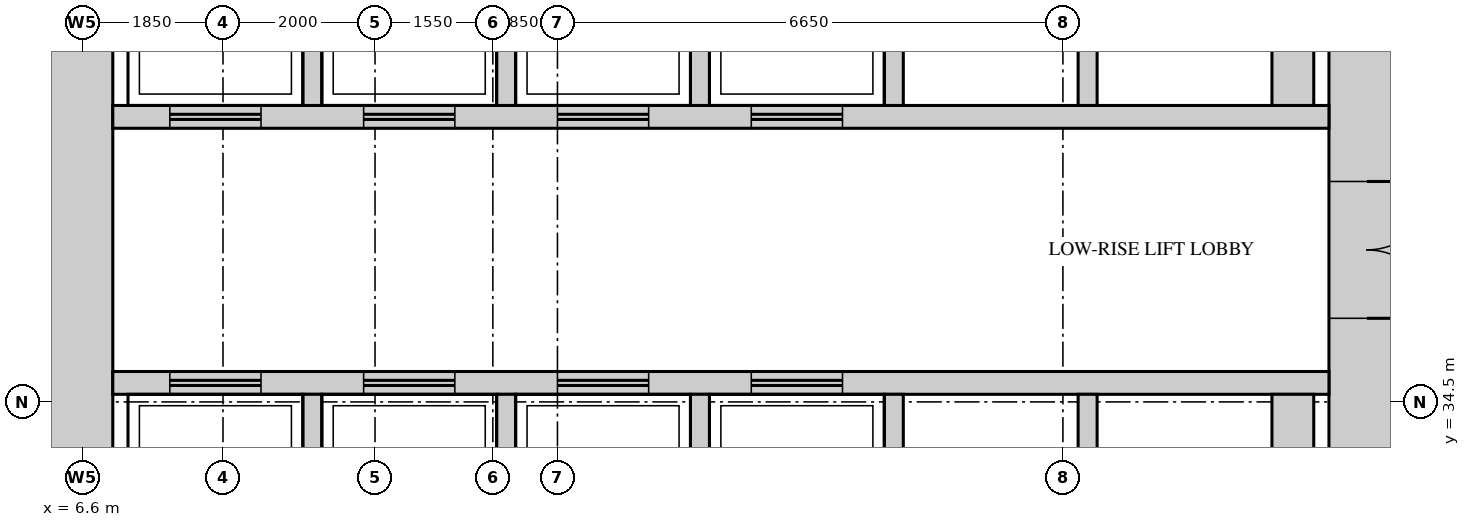
"""IFC4 building model, lengths in metres.
Left out: names, types, materials, properties, quantities, classifications, styles, units other than length and angle.
Written with IfcOpenShell. Run it as: python <this file> out.ifc"""

import sys

from ifc_helpers import new_model, si_unit, direction, frame, frame_2d, origin, place, context, subcontext, project, spatial, rectangle, extrude, source, transform, mapped, element, fill, save


model = new_model("IFC4")
c1 = context("Model", 3, precision=1e-05, world=origin(), true_north=direction((0.0, 1.0)))
c2 = subcontext(c1, "Body", "Model", "MODEL_VIEW")
j1 = project(units=[si_unit("LENGTHUNIT", "METRE"), si_unit("PLANEANGLEUNIT", "RADIAN")], contexts=[c1])
p1 = place(None, origin())
s1 = spatial("IfcSite", under=j1, at=p1, CompositionType="ELEMENT")
p2 = place(p1, origin())
s2 = spatial("IfcBuilding", under=s1, at=p2, CompositionType="ELEMENT")
p3 = place(p2, frame((0.0, 0.0, 110.3)))
s3 = spatial("IfcBuildingStorey", under=s2, at=p3, CompositionType="ELEMENT", Elevation=110.3)
m1 = source(origin(), c2, "Body", "SweptSolid", [
    extrude(rectangle(XDim=28.0, YDim=1.0, at=frame_2d((14.0, 0.0))), origin(), (0.0, 0.0, 1.0), 4.1),
])
p4 = place(p3, frame((23.5, 13.0, 0.0), z_axis=(0.0, 0.0, 1.0), x_axis=(0.0, 1.0, 0.0)))
e1 = element("IfcWall", 1, at=p4, inside=s3, PredefinedType="SHEAR", context=c2, shape_type="MappedRepresentation", body=[
    mapped(m1, transform((0.0, 0.0, 0.0))),
])
m2 = source(origin(), c2, "Body", "SweptSolid", [
    extrude(rectangle(XDim=1.8, YDim=2.1, at=frame_2d((0.9, 1.05))), frame((0.0, 0.51, 0.0), z_axis=(0.0, -1.0, 0.0), x_axis=(1.0, 0.0, 0.0)), (0.0, 0.0, 1.0), 1.02),
])
p5 = place(p4, frame((22.6, 0.0, 0.0)))
e2 = element("IfcOpeningElement", 2, at=p5, cuts=e1, PredefinedType="OPENING", context=c2, shape_type="MappedRepresentation", body=[
    mapped(m2, transform((0.0, 0.0, 0.0))),
])
m3 = source(origin(), c2, "Body", "SweptSolid", [
    extrude(rectangle(XDim=1.2, YDim=2.1, at=frame_2d((0.6, 1.05))), frame((0.0, 0.51, 0.0), z_axis=(0.0, -1.0, 0.0), x_axis=(1.0, 0.0, 0.0)), (0.0, 0.0, 1.0), 1.02),
])
p6 = place(p4, frame((13.85, 0.0, 0.0)))
e3 = element("IfcOpeningElement", 3, at=p6, cuts=e1, PredefinedType="OPENING", context=c2, shape_type="MappedRepresentation", body=[
    mapped(m3, transform((0.0, 0.0, 0.0))),
])
m4 = source(origin(), c2, "Body", "SweptSolid", [
    extrude(rectangle(XDim=0.9, YDim=2.1, at=frame_2d((0.45, 1.05))), frame((0.0, 0.51, 0.0), z_axis=(0.0, -1.0, 0.0), x_axis=(1.0, 0.0, 0.0)), (0.0, 0.0, 1.0), 1.02),
])
p7 = place(p4, frame((1.0, 0.0, 0.0)))
e4 = element("IfcOpeningElement", 4, at=p7, cuts=e1, PredefinedType="OPENING", context=c2, shape_type="MappedRepresentation", body=[
    mapped(m4, transform((0.0, 0.0, 0.0))),
])
p8 = place(p4, frame((4.0, 0.0, 0.0)))
e5 = element("IfcOpeningElement", 5, at=p8, cuts=e1, PredefinedType="OPENING", context=c2, shape_type="MappedRepresentation", body=[
    mapped(m4, transform((0.0, 0.0, 0.0))),
])
p9 = place(p4, frame((7.6, 0.0, 0.0)))
e6 = element("IfcOpeningElement", 6, at=p9, cuts=e1, PredefinedType="OPENING", context=c2, shape_type="MappedRepresentation", body=[
    mapped(m4, transform((0.0, 0.0, 0.0))),
])
p10 = place(p3, frame((6.5, 13.0, 0.0), z_axis=(0.0, 0.0, 1.0), x_axis=(0.0, 1.0, 0.0)))
e7 = element("IfcWall", 7, at=p10, inside=s3, PredefinedType="SHEAR", context=c2, shape_type="MappedRepresentation", body=[
    mapped(m1, transform((0.0, 0.0, 0.0))),
])
m5 = source(origin(), c2, "Body", "SweptSolid", [
    extrude(rectangle(XDim=16.0, YDim=0.3, at=frame_2d((8.0, 0.0))), origin(), (0.0, 0.0, 1.0), 4.1),
])
p11 = place(p3, frame((7.0, 38.25, 0.0), z_axis=(0.0, 0.0, 1.0), x_axis=(1.0, 0.0, 0.0)))
e8 = element("IfcWall", 8, at=p11, inside=s3, PredefinedType="STANDARD", context=c2, shape_type="MappedRepresentation", body=[
    mapped(m5, transform((0.0, 0.0, 0.0))),
])
m6 = source(origin(), c2, "Body", "SweptSolid", [
    extrude(rectangle(XDim=1.2, YDim=2.1, at=frame_2d((0.6, 1.05))), frame((0.0, 0.16, 0.0), z_axis=(0.0, -1.0, 0.0), x_axis=(1.0, 0.0, 0.0)), (0.0, 0.0, 1.0), 0.32),
])
p12 = place(p11, frame((0.75, 0.0, 0.0)))
e9 = element("IfcOpeningElement", 9, at=p12, cuts=e8, PredefinedType="OPENING", context=c2, shape_type="MappedRepresentation", body=[
    mapped(m6, transform((0.0, 0.0, 0.0))),
])
p13 = place(p11, frame((3.3, 0.0, 0.0)))
e10 = element("IfcOpeningElement", 10, at=p13, cuts=e8, PredefinedType="OPENING", context=c2, shape_type="MappedRepresentation", body=[
    mapped(m6, transform((0.0, 0.0, 0.0))),
])
p14 = place(p11, frame((5.85, 0.0, 0.0)))
e11 = element("IfcOpeningElement", 11, at=p14, cuts=e8, PredefinedType="OPENING", context=c2, shape_type="MappedRepresentation", body=[
    mapped(m6, transform((0.0, 0.0, 0.0))),
])
p15 = place(p11, frame((8.4, 0.0, 0.0)))
e12 = element("IfcOpeningElement", 12, at=p15, cuts=e8, PredefinedType="OPENING", context=c2, shape_type="MappedRepresentation", body=[
    mapped(m6, transform((0.0, 0.0, 0.0))),
])
p16 = place(p3, frame((7.0, 34.75, 0.0), z_axis=(0.0, 0.0, 1.0), x_axis=(1.0, 0.0, 0.0)))
e13 = element("IfcWall", 13, at=p16, inside=s3, PredefinedType="STANDARD", context=c2, shape_type="MappedRepresentation", body=[
    mapped(m5, transform((0.0, 0.0, 0.0))),
])
p17 = place(p16, frame((0.75, 0.0, 0.0)))
e14 = element("IfcOpeningElement", 14, at=p17, cuts=e13, PredefinedType="OPENING", context=c2, shape_type="MappedRepresentation", body=[
    mapped(m6, transform((0.0, 0.0, 0.0))),
])
p18 = place(p16, frame((3.3, 0.0, 0.0)))
e15 = element("IfcOpeningElement", 15, at=p18, cuts=e13, PredefinedType="OPENING", context=c2, shape_type="MappedRepresentation", body=[
    mapped(m6, transform((0.0, 0.0, 0.0))),
])
p19 = place(p16, frame((5.85, 0.0, 0.0)))
e16 = element("IfcOpeningElement", 16, at=p19, cuts=e13, PredefinedType="OPENING", context=c2, shape_type="MappedRepresentation", body=[
    mapped(m6, transform((0.0, 0.0, 0.0))),
])
p20 = place(p16, frame((8.4, 0.0, 0.0)))
e17 = element("IfcOpeningElement", 17, at=p20, cuts=e13, PredefinedType="OPENING", context=c2, shape_type="MappedRepresentation", body=[
    mapped(m6, transform((0.0, 0.0, 0.0))),
])
m7 = source(origin(), c2, "Body", "SweptSolid", [
    extrude(rectangle(XDim=2.6, YDim=0.25, at=frame_2d((1.3, 0.0))), origin(), (0.0, 0.0, 1.0), 4.1),
])
for number, where, z_axis, x_axis in (
    (18, (9.625, 38.4, 0.0), (0.0, 0.0, 1.0), (0.0, 1.0, 0.0)),
    (19, (12.175, 38.4, 0.0), (0.0, 0.0, 1.0), (0.0, 1.0, 0.0)),
    (20, (14.725, 38.4, 0.0), (0.0, 0.0, 1.0), (0.0, 1.0, 0.0)),
    (21, (17.275, 38.4, 0.0), (0.0, 0.0, 1.0), (0.0, 1.0, 0.0)),
    (22, (19.825, 38.4, 0.0), (0.0, 0.0, 1.0), (0.0, 1.0, 0.0)),
):
    element("IfcWall", number, at=place(p3, frame(where, z_axis=z_axis, x_axis=x_axis)), inside=s3, PredefinedType="STANDARD", context=c2, shape_type="MappedRepresentation", body=[
        mapped(m7, transform((0.0, 0.0, 0.0))),
    ])
m8 = source(origin(), c2, "Body", "SweptSolid", [
    extrude(rectangle(XDim=2.6, YDim=0.55, at=frame_2d((1.3, 0.0))), origin(), (0.0, 0.0, 1.0), 4.1),
])
p21 = place(p3, frame((22.525, 38.4, 0.0), z_axis=(0.0, 0.0, 1.0), x_axis=(0.0, 1.0, 0.0)))
e23 = element("IfcWall", 23, at=p21, inside=s3, PredefinedType="STANDARD", context=c2, shape_type="MappedRepresentation", body=[
    mapped(m8, transform((0.0, 0.0, 0.0))),
])
m9 = source(origin(), c2, "Body", "SweptSolid", [
    extrude(rectangle(XDim=2.4, YDim=0.25, at=frame_2d((1.2, 0.0))), origin(), (0.0, 0.0, 1.0), 4.1),
])
for number, where, z_axis, x_axis in (
    (24, (9.625, 32.2, 0.0), (0.0, 0.0, 1.0), (0.0, 1.0, 0.0)),
    (25, (12.175, 32.2, 0.0), (0.0, 0.0, 1.0), (0.0, 1.0, 0.0)),
    (26, (14.725, 32.2, 0.0), (0.0, 0.0, 1.0), (0.0, 1.0, 0.0)),
    (27, (17.275, 32.2, 0.0), (0.0, 0.0, 1.0), (0.0, 1.0, 0.0)),
    (28, (19.825, 32.2, 0.0), (0.0, 0.0, 1.0), (0.0, 1.0, 0.0)),
):
    element("IfcWall", number, at=place(p3, frame(where, z_axis=z_axis, x_axis=x_axis)), inside=s3, PredefinedType="STANDARD", context=c2, shape_type="MappedRepresentation", body=[
        mapped(m9, transform((0.0, 0.0, 0.0))),
    ])
m10 = source(origin(), c2, "Body", "SweptSolid", [
    extrude(rectangle(XDim=2.4, YDim=0.55, at=frame_2d((1.2, 0.0))), origin(), (0.0, 0.0, 1.0), 4.1),
])
p22 = place(p3, frame((22.525, 32.2, 0.0), z_axis=(0.0, 0.0, 1.0), x_axis=(0.0, 1.0, 0.0)))
e29 = element("IfcWall", 29, at=p22, inside=s3, PredefinedType="STANDARD", context=c2, shape_type="MappedRepresentation", body=[
    mapped(m10, transform((0.0, 0.0, 0.0))),
])
m11 = source(origin(), c2, "Body", "SweptSolid", [
    extrude(rectangle(XDim=1.8, YDim=2.1, at=frame_2d((0.9, 1.05))), frame((0.0, 0.45, 0.0), z_axis=(0.0, -1.0, 0.0), x_axis=(1.0, 0.0, 0.0)), (0.0, 0.0, 1.0), 0.9),
])
p23 = place(p5, origin())
e30 = element("IfcDoor", 30, at=p23, inside=s3, OperationType="DOUBLE_DOOR_SINGLE_SWING", PredefinedType="DOOR", context=c2, shape_type="MappedRepresentation", body=[
    mapped(m11, transform((0.0, 0.0, 0.0))),
])
fill(e2, e30)
m12 = source(origin(), c2, "Body", "SweptSolid", [
    extrude(rectangle(XDim=1.2, YDim=2.1, at=frame_2d((0.6, 1.05))), frame((0.0, 0.025, 0.0), z_axis=(0.0, -1.0, 0.0), x_axis=(1.0, 0.0, 0.0)), (0.0, 0.0, 1.0), 0.05),
])
p24 = place(p17, origin())
e31 = element("IfcDoor", 31, at=p24, inside=s3, OperationType="DOUBLE_DOOR_SLIDING", PredefinedType="DOOR", context=c2, shape_type="MappedRepresentation", body=[
    mapped(m12, transform((0.0, 0.0, 0.0))),
])
fill(e14, e31)
p25 = place(p18, origin())
e32 = element("IfcDoor", 32, at=p25, inside=s3, OperationType="DOUBLE_DOOR_SLIDING", PredefinedType="DOOR", context=c2, shape_type="MappedRepresentation", body=[
    mapped(m12, transform((0.0, 0.0, 0.0))),
])
fill(e15, e32)
p26 = place(p19, origin())
e33 = element("IfcDoor", 33, at=p26, inside=s3, OperationType="DOUBLE_DOOR_SLIDING", PredefinedType="DOOR", context=c2, shape_type="MappedRepresentation", body=[
    mapped(m12, transform((0.0, 0.0, 0.0))),
])
fill(e16, e33)
p27 = place(p20, origin())
e34 = element("IfcDoor", 34, at=p27, inside=s3, OperationType="DOUBLE_DOOR_SLIDING", PredefinedType="DOOR", context=c2, shape_type="MappedRepresentation", body=[
    mapped(m12, transform((0.0, 0.0, 0.0))),
])
fill(e17, e34)
p28 = place(p12, origin())
e35 = element("IfcDoor", 35, at=p28, inside=s3, OperationType="DOUBLE_DOOR_SLIDING", PredefinedType="DOOR", context=c2, shape_type="MappedRepresentation", body=[
    mapped(m12, transform((0.0, 0.0, 0.0))),
])
fill(e9, e35)
p29 = place(p13, origin())
e36 = element("IfcDoor", 36, at=p29, inside=s3, OperationType="DOUBLE_DOOR_SLIDING", PredefinedType="DOOR", context=c2, shape_type="MappedRepresentation", body=[
    mapped(m12, transform((0.0, 0.0, 0.0))),
])
fill(e10, e36)
p30 = place(p14, origin())
e37 = element("IfcDoor", 37, at=p30, inside=s3, OperationType="DOUBLE_DOOR_SLIDING", PredefinedType="DOOR", context=c2, shape_type="MappedRepresentation", body=[
    mapped(m12, transform((0.0, 0.0, 0.0))),
])
fill(e11, e37)
p31 = place(p15, origin())
e38 = element("IfcDoor", 38, at=p31, inside=s3, OperationType="DOUBLE_DOOR_SLIDING", PredefinedType="DOOR", context=c2, shape_type="MappedRepresentation", body=[
    mapped(m12, transform((0.0, 0.0, 0.0))),
])
fill(e12, e38)
save(model, sys.argv[1])
